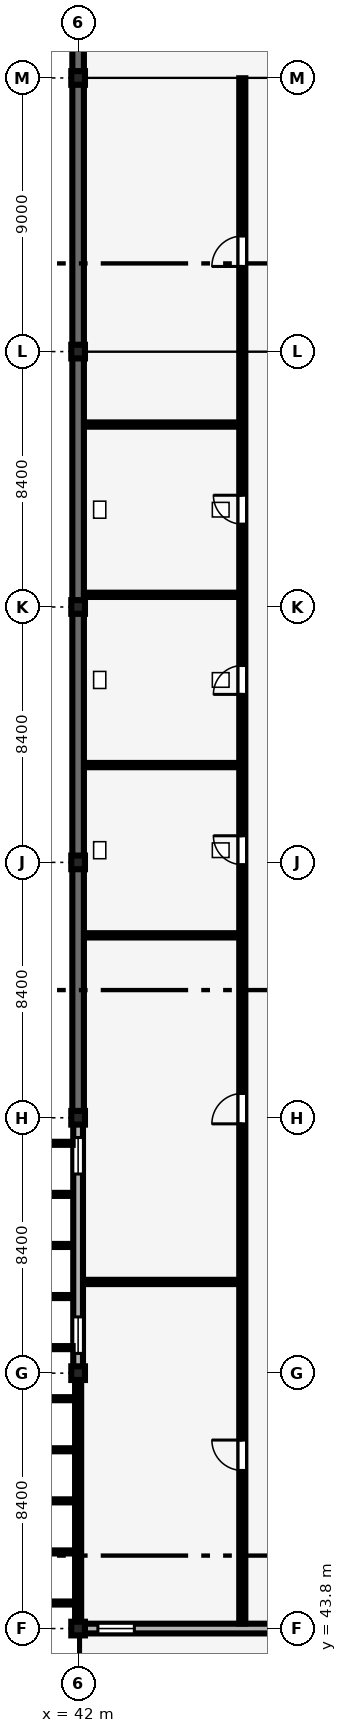
"""IFC4 building model, lengths in metres.
Left out: names, types, materials, properties, quantities, classifications, styles, units other than length and angle.
Written with IfcOpenShell. Run it as: python <this file> out.ifc"""

import sys

from ifc_helpers import new_model, si_unit, direction, frame, frame_2d, origin, origin_2d, place, context, subcontext, project, spatial, rectangle, extrude, element, fill, save


model = new_model("IFC4")
c1 = context("Model", 3, precision=1e-05, world=origin(), true_north=direction((0.0, 1.0)))
c2 = subcontext(c1, "Body", "Model", "MODEL_VIEW")
j1 = project(units=[si_unit("LENGTHUNIT", "METRE"), si_unit("PLANEANGLEUNIT", "RADIAN")], contexts=[c1])
p1 = place(None, origin())
s1 = spatial("IfcSite", under=j1, at=p1, CompositionType="ELEMENT")
p2 = place(p1, origin())
s2 = spatial("IfcBuilding", under=s1, at=p2, CompositionType="ELEMENT")
p3 = place(p2, frame((0.0, 0.0, 17.4)))
s3 = spatial("IfcBuildingStorey", under=s2, at=p3, CompositionType="ELEMENT", Elevation=17.4)
for number, where, z_axis, x_axis in (
    (1, (42.0, 43.8, 0.0), (0.0, 0.0, 1.0), (1.0, 0.0, 0.0)),
    (2, (42.0, 52.2, 0.0), (0.0, 0.0, 1.0), (1.0, 0.0, 0.0)),
    (3, (42.0, 60.6, 0.0), (0.0, 0.0, 1.0), (1.0, 0.0, 0.0)),
    (4, (42.0, 69.0, 0.0), (0.0, 0.0, 1.0), (1.0, 0.0, 0.0)),
    (5, (42.0, 77.4, 0.0), (0.0, 0.0, 1.0), (1.0, 0.0, 0.0)),
    (6, (42.0, 85.8, 0.0), (0.0, 0.0, 1.0), (1.0, 0.0, 0.0)),
    (7, (42.0, 94.8, 0.0), (0.0, 0.0, 1.0), (1.0, 0.0, 0.0)),
):
    element("IfcColumn", number, at=place(p3, frame(where, z_axis=z_axis, x_axis=x_axis)), inside=s3, PredefinedType="COLUMN", context=c2, shape_type="SweptSolid", body=[
        extrude(rectangle(XDim=0.45, YDim=0.45, at=origin_2d()), origin(), (0.0, 0.0, 1.0), 4.2),
    ])
p4 = place(p3, frame((42.0, 95.0, 0.0), z_axis=(0.0, 0.0, 1.0), x_axis=(0.0, 1.0, 0.0)))
e8 = element("IfcWall", 8, at=p4, inside=s3, PredefinedType="SHEAR", context=c2, shape_type="SweptSolid", body=[
    extrude(rectangle(XDim=8.6, YDim=0.38, at=frame_2d((4.3, 0.0))), origin(), (0.0, 0.0, 1.0), 3.19),
])
p5 = place(p3, frame((42.0, 86.0, 0.0), z_axis=(0.0, 0.0, 1.0), x_axis=(0.0, 1.0, 0.0)))
e9 = element("IfcWall", 9, at=p5, inside=s3, PredefinedType="SHEAR", context=c2, shape_type="SweptSolid", body=[
    extrude(rectangle(XDim=8.6, YDim=0.38, at=frame_2d((4.3, 0.0))), origin(), (0.0, 0.0, 1.0), 3.24),
])
p6 = place(p3, frame((42.0, 52.4, 0.0), z_axis=(0.0, 0.0, 1.0), x_axis=(0.0, 1.0, 0.0)))
e10 = element("IfcWall", 10, at=p6, inside=s3, PredefinedType="SOLIDWALL", context=c2, shape_type="SweptSolid", body=[
    extrude(rectangle(XDim=8.0, YDim=0.32, at=frame_2d((4.0, 0.0))), origin(), (0.0, 0.0, 1.0), 3.34),
])
p7 = place(p6, frame((0.45, 0.0, 0.85)))
e11 = element("IfcOpeningElement", 11, at=p7, cuts=e10, PredefinedType="OPENING", context=c2, shape_type="SweptSolid", body=[
    extrude(rectangle(XDim=1.2, YDim=1.5, at=frame_2d((0.6, 0.75))), frame((0.0, 0.17, 0.0), z_axis=(0.0, -1.0, 0.0), x_axis=(1.0, 0.0, 0.0)), (0.0, 0.0, 1.0), 0.34),
])
p8 = place(p6, frame((6.35, 0.0, 0.85)))
e12 = element("IfcOpeningElement", 12, at=p8, cuts=e10, PredefinedType="OPENING", context=c2, shape_type="SweptSolid", body=[
    extrude(rectangle(XDim=1.2, YDim=1.5, at=frame_2d((0.6, 0.75))), frame((0.0, 0.17, 0.0), z_axis=(0.0, -1.0, 0.0), x_axis=(1.0, 0.0, 0.0)), (0.0, 0.0, 1.0), 0.34),
])
p9 = place(p3, frame((42.0, 60.8, 0.0), z_axis=(0.0, 0.0, 1.0), x_axis=(0.0, 1.0, 0.0)))
e13 = element("IfcWall", 13, at=p9, inside=s3, PredefinedType="SHEAR", context=c2, shape_type="SweptSolid", body=[
    extrude(rectangle(XDim=8.0, YDim=0.38, at=frame_2d((4.0, 0.0))), origin(), (0.0, 0.0, 1.0), 3.29),
])
p10 = place(p3, frame((42.0, 69.2, 0.0), z_axis=(0.0, 0.0, 1.0), x_axis=(0.0, 1.0, 0.0)))
e14 = element("IfcWall", 14, at=p10, inside=s3, PredefinedType="SHEAR", context=c2, shape_type="SweptSolid", body=[
    extrude(rectangle(XDim=8.0, YDim=0.38, at=frame_2d((4.0, 0.0))), origin(), (0.0, 0.0, 1.0), 3.24),
])
p11 = place(p3, frame((42.0, 77.6, 0.0), z_axis=(0.0, 0.0, 1.0), x_axis=(0.0, 1.0, 0.0)))
e15 = element("IfcWall", 15, at=p11, inside=s3, PredefinedType="SHEAR", context=c2, shape_type="SweptSolid", body=[
    extrude(rectangle(XDim=8.0, YDim=0.38, at=frame_2d((4.0, 0.0))), origin(), (0.0, 0.0, 1.0), 3.29),
])
p12 = place(p3, frame((42.2, 43.8, 0.0), z_axis=(0.0, 0.0, 1.0), x_axis=(1.0, 0.0, 0.0)))
e16 = element("IfcWall", 16, at=p12, inside=s3, PredefinedType="SOLIDWALL", context=c2, shape_type="SweptSolid", body=[
    extrude(rectangle(XDim=8.0, YDim=0.32, at=frame_2d((4.0, 0.0))), origin(), (0.0, 0.0, 1.0), 3.29),
])
p13 = place(p12, frame((0.45, 0.0, 0.9)))
e17 = element("IfcOpeningElement", 17, at=p13, cuts=e16, PredefinedType="OPENING", context=c2, shape_type="SweptSolid", body=[
    extrude(rectangle(XDim=1.2, YDim=1.5, at=frame_2d((0.6, 0.75))), frame((0.0, 0.17, 0.0), z_axis=(0.0, -1.0, 0.0), x_axis=(1.0, 0.0, 0.0)), (0.0, 0.0, 1.0), 0.34),
])
p14 = place(p12, frame((6.35, 0.0, 0.9)))
e18 = element("IfcOpeningElement", 18, at=p14, cuts=e16, PredefinedType="OPENING", context=c2, shape_type="SweptSolid", body=[
    extrude(rectangle(XDim=1.2, YDim=1.8, at=frame_2d((0.6, 0.9))), frame((0.0, 0.17, 0.0), z_axis=(0.0, -1.0, 0.0), x_axis=(1.0, 0.0, 0.0)), (0.0, 0.0, 1.0), 0.34),
])
p15 = place(p3, frame((42.165, 55.2, 0.0), z_axis=(0.0, 0.0, 1.0), x_axis=(1.0, 0.0, 0.0)))
e19 = element("IfcWall", 19, at=p15, inside=s3, PredefinedType="PARTITIONING", context=c2, shape_type="SweptSolid", body=[
    extrude(rectangle(XDim=5.13, YDim=0.14, at=frame_2d((2.565, 0.0))), origin(), (0.0, 0.0, 1.0), 3.49),
])
p16 = place(p3, frame((42.195, 66.6, 0.0), z_axis=(0.0, 0.0, 1.0), x_axis=(1.0, 0.0, 0.0)))
e20 = element("IfcWall", 20, at=p16, inside=s3, PredefinedType="PARTITIONING", context=c2, shape_type="SweptSolid", body=[
    extrude(rectangle(XDim=5.1, YDim=0.14, at=frame_2d((2.55, 0.0))), origin(), (0.0, 0.0, 1.0), 3.49),
])
p17 = place(p3, frame((42.195, 72.2, 0.0), z_axis=(0.0, 0.0, 1.0), x_axis=(1.0, 0.0, 0.0)))
e21 = element("IfcWall", 21, at=p17, inside=s3, PredefinedType="PARTITIONING", context=c2, shape_type="SweptSolid", body=[
    extrude(rectangle(XDim=5.1, YDim=0.14, at=frame_2d((2.55, 0.0))), origin(), (0.0, 0.0, 1.0), 3.9),
])
p18 = place(p3, frame((42.195, 77.8, 0.0), z_axis=(0.0, 0.0, 1.0), x_axis=(1.0, 0.0, 0.0)))
e22 = element("IfcWall", 22, at=p18, inside=s3, PredefinedType="PARTITIONING", context=c2, shape_type="SweptSolid", body=[
    extrude(rectangle(XDim=5.1, YDim=0.14, at=frame_2d((2.55, 0.0))), origin(), (0.0, 0.0, 1.0), 3.19),
])
p19 = place(p3, frame((42.195, 83.4, 0.0), z_axis=(0.0, 0.0, 1.0), x_axis=(1.0, 0.0, 0.0)))
e23 = element("IfcWall", 23, at=p19, inside=s3, PredefinedType="PARTITIONING", context=c2, shape_type="SweptSolid", body=[
    extrude(rectangle(XDim=5.1, YDim=0.14, at=frame_2d((2.55, 0.0))), origin(), (0.0, 0.0, 1.0), 3.9),
])
p20 = place(p3, frame((47.4, 43.965, 0.0), z_axis=(0.0, 0.0, 1.0), x_axis=(0.0, 1.0, 0.0)))
e24 = element("IfcWall", 24, at=p20, inside=s3, PredefinedType="PARTITIONING", context=c2, shape_type="SweptSolid", body=[
    extrude(rectangle(XDim=50.825, YDim=0.2, at=frame_2d((25.413, 0.0))), origin(), (0.0, 0.0, 1.0), 3.9),
])
p21 = place(p20, frame((5.035, 0.0, 0.0)))
e25 = element("IfcOpeningElement", 25, at=p21, cuts=e24, PredefinedType="OPENING", context=c2, shape_type="SweptSolid", body=[
    extrude(rectangle(XDim=1.0, YDim=2.15, at=frame_2d((0.5, 1.075))), frame((0.0, 0.11, 0.0), z_axis=(0.0, -1.0, 0.0), x_axis=(1.0, 0.0, 0.0)), (0.0, 0.0, 1.0), 0.22),
])
p22 = place(p20, frame((16.435, 0.0, 0.0)))
e26 = element("IfcOpeningElement", 26, at=p22, cuts=e24, PredefinedType="OPENING", context=c2, shape_type="SweptSolid", body=[
    extrude(rectangle(XDim=1.0, YDim=2.15, at=frame_2d((0.5, 1.075))), frame((0.0, 0.11, 0.0), z_axis=(0.0, -1.0, 0.0), x_axis=(1.0, 0.0, 0.0)), (0.0, 0.0, 1.0), 0.22),
])
p23 = place(p20, frame((24.96, 0.0, 0.0)))
e27 = element("IfcOpeningElement", 27, at=p23, cuts=e24, PredefinedType="OPENING", context=c2, shape_type="SweptSolid", body=[
    extrude(rectangle(XDim=0.95, YDim=2.2, at=frame_2d((0.475, 1.1))), frame((0.0, 0.11, 0.0), z_axis=(0.0, -1.0, 0.0), x_axis=(1.0, 0.0, 0.0)), (0.0, 0.0, 1.0), 0.22),
])
p24 = place(p20, frame((30.56, 0.0, 0.0)))
e28 = element("IfcOpeningElement", 28, at=p24, cuts=e24, PredefinedType="OPENING", context=c2, shape_type="SweptSolid", body=[
    extrude(rectangle(XDim=0.95, YDim=2.2, at=frame_2d((0.475, 1.1))), frame((0.0, 0.11, 0.0), z_axis=(0.0, -1.0, 0.0), x_axis=(1.0, 0.0, 0.0)), (0.0, 0.0, 1.0), 0.22),
])
p25 = place(p20, frame((36.16, 0.0, 0.0)))
e29 = element("IfcOpeningElement", 29, at=p25, cuts=e24, PredefinedType="OPENING", context=c2, shape_type="SweptSolid", body=[
    extrude(rectangle(XDim=0.95, YDim=2.1, at=frame_2d((0.475, 1.05))), frame((0.0, 0.11, 0.0), z_axis=(0.0, -1.0, 0.0), x_axis=(1.0, 0.0, 0.0)), (0.0, 0.0, 1.0), 0.22),
])
p26 = place(p20, frame((44.635, 0.0, 0.0)))
e30 = element("IfcOpeningElement", 30, at=p26, cuts=e24, PredefinedType="OPENING", context=c2, shape_type="SweptSolid", body=[
    extrude(rectangle(XDim=1.0, YDim=2.15, at=frame_2d((0.5, 1.075))), frame((0.0, 0.11, 0.0), z_axis=(0.0, -1.0, 0.0), x_axis=(1.0, 0.0, 0.0)), (0.0, 0.0, 1.0), 0.22),
])
p27 = place(p7, origin())
e31 = element("IfcWindow", 31, at=p27, inside=s3, PartitioningType="SINGLE_PANEL", PredefinedType="WINDOW", context=c2, shape_type="SweptSolid", body=[
    extrude(rectangle(XDim=1.2, YDim=1.5, at=frame_2d((0.6, 0.75))), frame((0.0, 0.03, 0.0), z_axis=(0.0, -1.0, 0.0), x_axis=(1.0, 0.0, 0.0)), (0.0, 0.0, 1.0), 0.06),
])
fill(e11, e31)
p28 = place(p8, origin())
e32 = element("IfcWindow", 32, at=p28, inside=s3, PartitioningType="SINGLE_PANEL", PredefinedType="WINDOW", context=c2, shape_type="SweptSolid", body=[
    extrude(rectangle(XDim=1.2, YDim=1.5, at=frame_2d((0.6, 0.75))), frame((0.0, 0.03, 0.0), z_axis=(0.0, -1.0, 0.0), x_axis=(1.0, 0.0, 0.0)), (0.0, 0.0, 1.0), 0.06),
])
fill(e12, e32)
p29 = place(p13, origin())
e33 = element("IfcWindow", 33, at=p29, inside=s3, PartitioningType="SINGLE_PANEL", PredefinedType="WINDOW", context=c2, shape_type="SweptSolid", body=[
    extrude(rectangle(XDim=1.2, YDim=1.5, at=frame_2d((0.6, 0.75))), frame((0.0, 0.03, 0.0), z_axis=(0.0, -1.0, 0.0), x_axis=(1.0, 0.0, 0.0)), (0.0, 0.0, 1.0), 0.06),
])
fill(e17, e33)
p30 = place(p21, origin())
e34 = element("IfcDoor", 34, at=p30, inside=s3, OperationType="SINGLE_SWING_RIGHT", PredefinedType="DOOR", context=c2, shape_type="SweptSolid", body=[
    extrude(rectangle(XDim=1.0, YDim=2.15, at=frame_2d((0.5, 1.075))), frame((0.0, 0.025, 0.0), z_axis=(0.0, -1.0, 0.0), x_axis=(1.0, 0.0, 0.0)), (0.0, 0.0, 1.0), 0.05),
])
fill(e25, e34)
p31 = place(p22, origin())
e35 = element("IfcDoor", 35, at=p31, inside=s3, OperationType="SINGLE_SWING_LEFT", PredefinedType="DOOR", context=c2, shape_type="SweptSolid", body=[
    extrude(rectangle(XDim=1.0, YDim=2.15, at=frame_2d((0.5, 1.075))), frame((0.0, 0.025, 0.0), z_axis=(0.0, -1.0, 0.0), x_axis=(1.0, 0.0, 0.0)), (0.0, 0.0, 1.0), 0.05),
])
fill(e26, e35)
p32 = place(p23, origin())
e36 = element("IfcDoor", 36, at=p32, inside=s3, OperationType="SINGLE_SWING_RIGHT", PredefinedType="DOOR", context=c2, shape_type="SweptSolid", body=[
    extrude(rectangle(XDim=0.95, YDim=2.2, at=frame_2d((0.475, 1.1))), frame((0.0, 0.025, 0.0), z_axis=(0.0, -1.0, 0.0), x_axis=(1.0, 0.0, 0.0)), (0.0, 0.0, 1.0), 0.05),
])
fill(e27, e36)
p33 = place(p24, origin())
e37 = element("IfcDoor", 37, at=p33, inside=s3, OperationType="SINGLE_SWING_LEFT", PredefinedType="DOOR", context=c2, shape_type="SweptSolid", body=[
    extrude(rectangle(XDim=0.95, YDim=2.2, at=frame_2d((0.475, 1.1))), frame((0.0, 0.025, 0.0), z_axis=(0.0, -1.0, 0.0), x_axis=(1.0, 0.0, 0.0)), (0.0, 0.0, 1.0), 0.05),
])
fill(e28, e37)
p34 = place(p25, origin())
e38 = element("IfcDoor", 38, at=p34, inside=s3, OperationType="SINGLE_SWING_RIGHT", PredefinedType="DOOR", context=c2, shape_type="SweptSolid", body=[
    extrude(rectangle(XDim=0.95, YDim=2.1, at=frame_2d((0.475, 1.05))), frame((0.0, 0.025, 0.0), z_axis=(0.0, -1.0, 0.0), x_axis=(1.0, 0.0, 0.0)), (0.0, 0.0, 1.0), 0.05),
])
fill(e29, e38)
p35 = place(p26, origin())
e39 = element("IfcDoor", 39, at=p35, inside=s3, OperationType="SINGLE_SWING_LEFT", PredefinedType="DOOR", context=c2, shape_type="SweptSolid", body=[
    extrude(rectangle(XDim=1.0, YDim=2.15, at=frame_2d((0.5, 1.075))), frame((0.0, 0.025, 0.0), z_axis=(0.0, -1.0, 0.0), x_axis=(1.0, 0.0, 0.0)), (0.0, 0.0, 1.0), 0.05),
])
fill(e30, e39)
save(model, sys.argv[1])
